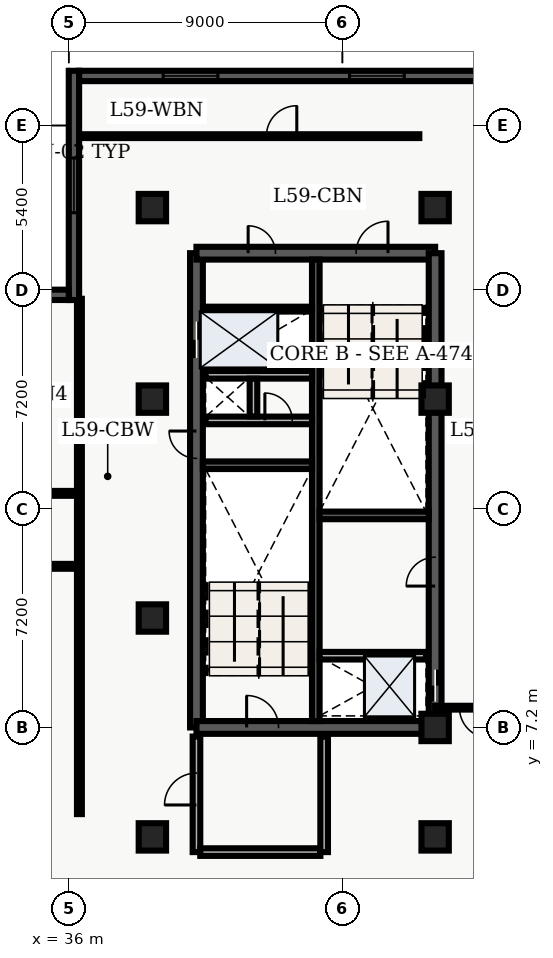
"""IFC4 building model, lengths in metres.
Left out: names, types, materials, properties, quantities, classifications, styles, units other than length and angle.
Written with IfcOpenShell. Run it as: python <this file> out.ifc"""

import sys

from ifc_helpers import new_model, entity, si_unit, converted_unit, direction, frame, origin_with_axes, origin_2d_with_axis, place, context, subcontext, project, spatial, polyline, rectangle, outline, extrude, element, fill, save


model = new_model("IFC4")
c1 = context("Model", 3, precision=1e-05, world=origin_with_axes(), true_north=direction((0.0, 1.0)))
c2 = subcontext(c1, "Body", "Model", "MODEL_VIEW")
j1 = project(units=[si_unit("LENGTHUNIT", "METRE"), converted_unit("PLANEANGLEUNIT", "DEGREE", entity("IfcPlaneAngleMeasure", 0.017), si_unit("PLANEANGLEUNIT", "RADIAN"), dimensions=[0, 0, 0, 0, 0, 0, 0])], contexts=[c1])
p1 = place(None, origin_with_axes())
s1 = spatial("IfcSite", under=j1, at=p1, CompositionType="ELEMENT")
p2 = place(p1, origin_with_axes())
s2 = spatial("IfcBuilding", under=s1, at=p2, CompositionType="ELEMENT")
p3 = place(p2, frame((0.0, 0.0, 240.3), z_axis=(0.0, 0.0, 1.0), x_axis=(1.0, 0.0, 0.0)))
s3 = spatial("IfcBuildingStorey", under=s2, at=p3, CompositionType="ELEMENT", Elevation=240.3)
p4 = place(p3, frame((40.2, 7.2, 0.0), z_axis=(0.0, 0.0, 1.0), x_axis=(0.0, 1.0, 0.0)))
e1 = element("IfcWall", 1, at=p4, inside=s3, PredefinedType="SHEAR", context=c2, shape_type="SweptSolid", body=[
    extrude(outline(polyline([(0.0, -0.21), (15.6, -0.21), (15.6, 0.21), (0.0, 0.21), (0.0, -0.21)])), origin_with_axes(), (0.0, 0.0, 1.0), 3.66),
])
p5 = place(p4, frame((12.75, 0.0, 0.0), z_axis=(0.0, 0.0, 1.0), x_axis=(1.0, 0.0, 0.0)))
e2 = element("IfcOpeningElement", 2, at=p5, cuts=e1, PredefinedType="OPENING", context=c2, shape_type="SweptSolid", body=[
    extrude(rectangle(XDim=1.2, YDim=0.44, at=origin_2d_with_axis()), origin_with_axes(), (0.0, 0.0, 1.0), 2.15),
])
p6 = place(p4, frame((9.3, 0.0, 0.0), z_axis=(0.0, 0.0, 1.0), x_axis=(1.0, 0.0, 0.0)))
e3 = element("IfcOpeningElement", 3, at=p6, cuts=e1, PredefinedType="OPENING", context=c2, shape_type="SweptSolid", body=[
    extrude(rectangle(XDim=0.9, YDim=0.44, at=origin_2d_with_axis()), origin_with_axes(), (0.0, 0.0, 1.0), 2.15),
])
p7 = place(p3, frame((40.2, 7.2, 0.0), z_axis=(0.0, 0.0, 1.0), x_axis=(1.0, 0.0, 0.0)))
e4 = element("IfcWall", 4, at=p7, inside=s3, PredefinedType="SHEAR", context=c2, shape_type="SweptSolid", body=[
    extrude(outline(polyline([(0.0, -0.21), (7.85, -0.21), (7.85, 0.21), (0.0, 0.21), (0.0, -0.21)])), origin_with_axes(), (0.0, 0.0, 1.0), 3.66),
])
p8 = place(p7, frame((2.175, 0.0, 0.0), z_axis=(0.0, 0.0, 1.0), x_axis=(1.0, 0.0, 0.0)))
e5 = element("IfcOpeningElement", 5, at=p8, cuts=e4, PredefinedType="OPENING", context=c2, shape_type="SweptSolid", body=[
    extrude(rectangle(XDim=1.05, YDim=0.44, at=origin_2d_with_axis()), origin_with_axes(), (0.0, 0.0, 1.0), 2.15),
])
p9 = place(p3, frame((40.2, 22.8, 0.0), z_axis=(0.0, 0.0, 1.0), x_axis=(1.0, 0.0, 0.0)))
e6 = element("IfcWall", 6, at=p9, inside=s3, PredefinedType="SHEAR", context=c2, shape_type="SweptSolid", body=[
    extrude(outline(polyline([(0.0, -0.21), (7.85, -0.21), (7.85, 0.21), (0.0, 0.21), (0.0, -0.21)])), origin_with_axes(), (0.0, 0.0, 1.0), 3.66),
])
p10 = place(p9, frame((5.775, 0.0, 0.0), z_axis=(0.0, 0.0, 1.0), x_axis=(1.0, 0.0, 0.0)))
e7 = element("IfcOpeningElement", 7, at=p10, cuts=e6, PredefinedType="OPENING", context=c2, shape_type="SweptSolid", body=[
    extrude(rectangle(XDim=1.05, YDim=0.44, at=origin_2d_with_axis()), origin_with_axes(), (0.0, 0.0, 1.0), 2.15),
])
p11 = place(p9, frame((2.15, 0.0, 0.0), z_axis=(0.0, 0.0, 1.0), x_axis=(1.0, 0.0, 0.0)))
e8 = element("IfcOpeningElement", 8, at=p11, cuts=e6, PredefinedType="OPENING", context=c2, shape_type="SweptSolid", body=[
    extrude(rectangle(XDim=0.9, YDim=0.44, at=origin_2d_with_axis()), origin_with_axes(), (0.0, 0.0, 1.0), 2.15),
])
p12 = place(p3, frame((48.05, 7.2, 0.0), z_axis=(0.0, 0.0, 1.0), x_axis=(0.0, 1.0, 0.0)))
e9 = element("IfcWall", 9, at=p12, inside=s3, PredefinedType="SHEAR", context=c2, shape_type="SweptSolid", body=[
    extrude(outline(polyline([(0.0, -0.21), (15.6, -0.21), (15.6, 0.21), (0.0, 0.21), (0.0, -0.21)])), origin_with_axes(), (0.0, 0.0, 1.0), 3.66),
])
p13 = place(p12, frame((1.375, 0.0, 0.0), z_axis=(0.0, 0.0, 1.0), x_axis=(1.0, 0.0, 0.0)))
e10 = element("IfcOpeningElement", 10, at=p13, cuts=e9, PredefinedType="OPENING", context=c2, shape_type="SweptSolid", body=[
    extrude(rectangle(XDim=1.05, YDim=0.44, at=origin_2d_with_axis()), origin_with_axes(), (0.0, 0.0, 1.0), 2.15),
])
p14 = place(p12, frame((5.125, 0.0, 0.0), z_axis=(0.0, 0.0, 1.0), x_axis=(1.0, 0.0, 0.0)))
e11 = element("IfcOpeningElement", 11, at=p14, cuts=e9, PredefinedType="OPENING", context=c2, shape_type="SweptSolid", body=[
    extrude(rectangle(XDim=0.95, YDim=0.44, at=origin_2d_with_axis()), origin_with_axes(), (0.0, 0.0, 1.0), 2.15),
])
p15 = place(p3, frame((44.125, 7.41, 0.0), z_axis=(0.0, 0.0, 1.0), x_axis=(0.0, 1.0, 0.0)))
e12 = element("IfcWall", 12, at=p15, inside=s3, PredefinedType="SHEAR", context=c2, shape_type="SweptSolid", body=[
    extrude(outline(polyline([(0.0, -0.125), (15.18, -0.125), (15.18, 0.125), (0.0, 0.125), (0.0, -0.125)])), origin_with_axes(), (0.0, 0.0, 1.0), 3.66),
])
for number, where, z_axis, x_axis in (
    (13, (40.41, 15.825, 0.0), (0.0, 0.0, 1.0), (1.0, 0.0, 0.0)),
    (14, (44.25, 14.175, 0.0), (0.0, 0.0, 1.0), (1.0, 0.0, 0.0)),
):
    element("IfcWall", number, at=place(p3, frame(where, z_axis=z_axis, x_axis=x_axis)), inside=s3, PredefinedType="SHEAR", context=c2, shape_type="SweptSolid", body=[
        extrude(outline(polyline([(0.0, -0.125), (3.59, -0.125), (3.59, 0.125), (0.0, 0.125), (0.0, -0.125)])), origin_with_axes(), (0.0, 0.0, 1.0), 3.66),
    ])
p16 = place(p3, frame((40.5, 17.3, 0.0), z_axis=(0.0, 0.0, 1.0), x_axis=(1.0, 0.0, 0.0)))
e15 = element("IfcWall", 15, at=p16, inside=s3, PredefinedType="SOLIDWALL", context=c2, shape_type="SweptSolid", body=[
    extrude(outline(polyline([(0.0, -0.125), (3.5, -0.125), (3.5, 0.125), (0.0, 0.125), (0.0, -0.125)])), origin_with_axes(), (0.0, 0.0, 1.0), 2.7),
])
p17 = place(p16, frame((2.4, 0.0, 0.0), z_axis=(0.0, 0.0, 1.0), x_axis=(1.0, 0.0, 0.0)))
e16 = element("IfcOpeningElement", 16, at=p17, cuts=e15, PredefinedType="OPENING", context=c2, shape_type="SweptSolid", body=[
    extrude(rectangle(XDim=0.9, YDim=0.27, at=origin_2d_with_axis()), origin_with_axes(), (0.0, 0.0, 1.0), 2.15),
])
p18 = place(p3, frame((40.5, 18.8, 0.0), z_axis=(0.0, 0.0, 1.0), x_axis=(1.0, 0.0, 0.0)))
e17 = element("IfcWall", 17, at=p18, inside=s3, PredefinedType="SOLIDWALL", context=c2, shape_type="SweptSolid", body=[
    extrude(outline(polyline([(0.0, -0.125), (3.5, -0.125), (3.5, 0.125), (0.0, 0.125), (0.0, -0.125)])), origin_with_axes(), (0.0, 0.0, 1.0), 2.7),
])
p19 = place(p3, frame((42.075, 17.43, 0.0), z_axis=(0.0, 0.0, 1.0), x_axis=(0.0, 1.0, 0.0)))
e18 = element("IfcWall", 18, at=p19, inside=s3, PredefinedType="SOLIDWALL", context=c2, shape_type="SweptSolid", body=[
    extrude(outline(polyline([(0.0, -0.125), (1.24, -0.125), (1.24, 0.125), (0.0, 0.125), (0.0, -0.125)])), origin_with_axes(), (0.0, 0.0, 1.0), 2.7),
])
p20 = place(p3, frame((40.2, 3.1, 0.0), z_axis=(0.0, 0.0, 1.0), x_axis=(0.0, 1.0, 0.0)))
e19 = element("IfcWall", 19, at=p20, inside=s3, PredefinedType="SOLIDWALL", context=c2, shape_type="SweptSolid", body=[
    extrude(outline(polyline([(0.0, -0.125), (3.8, -0.125), (3.8, 0.125), (0.0, 0.125), (0.0, -0.125)])), origin_with_axes(), (0.0, 0.0, 1.0), 2.7),
])
p21 = place(p20, frame((2.075, 0.0, 0.0), z_axis=(0.0, 0.0, 1.0), x_axis=(1.0, 0.0, 0.0)))
e20 = element("IfcOpeningElement", 20, at=p21, cuts=e19, PredefinedType="OPENING", context=c2, shape_type="SweptSolid", body=[
    extrude(rectangle(XDim=1.05, YDim=0.27, at=origin_2d_with_axis()), origin_with_axes(), (0.0, 0.0, 1.0), 2.15),
])
p22 = place(p3, frame((40.325, 3.1, 0.0), z_axis=(0.0, 0.0, 1.0), x_axis=(1.0, 0.0, 0.0)))
e21 = element("IfcWall", 21, at=p22, inside=s3, PredefinedType="SOLIDWALL", context=c2, shape_type="SweptSolid", body=[
    extrude(outline(polyline([(0.0, -0.125), (3.95, -0.125), (3.95, 0.125), (0.0, 0.125), (0.0, -0.125)])), origin_with_axes(), (0.0, 0.0, 1.0), 2.7),
])
p23 = place(p3, frame((44.4, 3.1, 0.0), z_axis=(0.0, 0.0, 1.0), x_axis=(0.0, 1.0, 0.0)))
e22 = element("IfcWall", 22, at=p23, inside=s3, PredefinedType="SOLIDWALL", context=c2, shape_type="SweptSolid", body=[
    extrude(outline(polyline([(0.0, -0.125), (3.8, -0.125), (3.8, 0.125), (0.0, 0.125), (0.0, -0.125)])), origin_with_axes(), (0.0, 0.0, 1.0), 2.7),
])
for number, where, z_axis, x_axis in (
    (23, (38.75, 3.6, 0.0), (0.0, 0.0, 1.0), (1.0, 0.0, 0.0)),
    (24, (38.75, 10.8, 0.0), (0.0, 0.0, 1.0), (1.0, 0.0, 0.0)),
    (25, (38.75, 18.0, 0.0), (0.0, 0.0, 1.0), (1.0, 0.0, 0.0)),
    (26, (38.75, 24.3, 0.0), (0.0, 0.0, 1.0), (1.0, 0.0, 0.0)),
    (27, (48.05, 3.6, 0.0), (0.0, 0.0, 1.0), (1.0, 0.0, 0.0)),
    (28, (48.05, 7.2, 0.0), (0.0, 0.0, 1.0), (1.0, 0.0, 0.0)),
    (29, (48.05, 18.0, 0.0), (0.0, 0.0, 1.0), (1.0, 0.0, 0.0)),
    (30, (48.05, 24.3, 0.0), (0.0, 0.0, 1.0), (1.0, 0.0, 0.0)),
):
    element("IfcColumn", number, at=place(p3, frame(where, z_axis=z_axis, x_axis=x_axis)), inside=s3, PredefinedType="COLUMN", context=c2, shape_type="SweptSolid", body=[
        extrude(rectangle(XDim=0.9, YDim=0.9, at=origin_2d_with_axis()), origin_with_axes(), (0.0, 0.0, 1.0), 3.9),
    ])
p24 = place(p3, frame((40.5, 20.96, 0.0), z_axis=(0.0, 0.0, 1.0), x_axis=(1.0, 0.0, 0.0)))
e31 = element("IfcWall", 31, at=p24, inside=s3, PredefinedType="PARTITIONING", context=c2, shape_type="SweptSolid", body=[
    extrude(outline(polyline([(0.0, -0.08), (3.5, -0.08), (3.5, 0.08), (0.0, 0.08), (0.0, -0.08)])), origin_with_axes(), (0.0, 0.0, 1.0), 2.7),
])
p25 = place(p3, frame((44.25, 9.56, 0.0), z_axis=(0.0, 0.0, 1.0), x_axis=(1.0, 0.0, 0.0)))
e32 = element("IfcWall", 32, at=p25, inside=s3, PredefinedType="SOLIDWALL", context=c2, shape_type="SweptSolid", body=[
    extrude(outline(polyline([(0.0, -0.125), (3.5, -0.125), (3.5, 0.125), (0.0, 0.125), (0.0, -0.125)])), origin_with_axes(), (0.0, 0.0, 1.0), 2.7),
])
p26 = place(p3, frame((20.3, 12.5, 0.0), z_axis=(0.0, 0.0, 1.0), x_axis=(1.0, 0.0, 0.0)))
e33 = element("IfcWall", 33, at=p26, inside=s3, PredefinedType="PARTITIONING", context=c2, shape_type="SweptSolid", body=[
    extrude(outline(polyline([(0.0, -0.08), (16.05, -0.08), (16.05, 0.08), (0.0, 0.08), (0.0, -0.08)])), origin_with_axes(), (0.0, 0.0, 1.0), 2.7),
])
p27 = place(p26, frame((8.075, 0.0, 0.0), z_axis=(0.0, 0.0, 1.0), x_axis=(1.0, 0.0, 0.0)))
e34 = element("IfcOpeningElement", 34, at=p27, cuts=e33, PredefinedType="OPENING", context=c2, shape_type="SweptSolid", body=[
    extrude(rectangle(XDim=1.0, YDim=0.18, at=origin_2d_with_axis()), origin_with_axes(), (0.0, 0.0, 1.0), 2.15),
])
p28 = place(p3, frame((20.3, 14.9, 0.0), z_axis=(0.0, 0.0, 1.0), x_axis=(1.0, 0.0, 0.0)))
e35 = element("IfcWall", 35, at=p28, inside=s3, PredefinedType="PARTITIONING", context=c2, shape_type="SweptSolid", body=[
    extrude(outline(polyline([(0.0, -0.08), (16.05, -0.08), (16.05, 0.08), (0.0, 0.08), (0.0, -0.08)])), origin_with_axes(), (0.0, 0.0, 1.0), 2.7),
])
p29 = place(p28, frame((2.358, 0.0, 0.0), z_axis=(0.0, 0.0, 1.0), x_axis=(1.0, 0.0, 0.0)))
e36 = element("IfcOpeningElement", 36, at=p29, cuts=e35, PredefinedType="OPENING", context=c2, shape_type="SweptSolid", body=[
    extrude(rectangle(XDim=1.0, YDim=0.18, at=origin_2d_with_axis()), origin_with_axes(), (0.0, 0.0, 1.0), 2.15),
])
p30 = place(p28, frame((5.918, 0.0, 0.0), z_axis=(0.0, 0.0, 1.0), x_axis=(1.0, 0.0, 0.0)))
e37 = element("IfcOpeningElement", 37, at=p30, cuts=e35, PredefinedType="OPENING", context=c2, shape_type="SweptSolid", body=[
    extrude(rectangle(XDim=1.0, YDim=0.18, at=origin_2d_with_axis()), origin_with_axes(), (0.0, 0.0, 1.0), 2.15),
])
p31 = place(p28, frame((9.89, 0.0, 0.0), z_axis=(0.0, 0.0, 1.0), x_axis=(1.0, 0.0, 0.0)))
e38 = element("IfcOpeningElement", 38, at=p31, cuts=e35, PredefinedType="OPENING", context=c2, shape_type="SweptSolid", body=[
    extrude(rectangle(XDim=1.2, YDim=0.18, at=origin_2d_with_axis()), origin_with_axes(), (0.0, 0.0, 1.0), 2.2),
])
p32 = place(p28, frame((14.225, 0.0, 0.0), z_axis=(0.0, 0.0, 1.0), x_axis=(1.0, 0.0, 0.0)))
e39 = element("IfcOpeningElement", 39, at=p32, cuts=e35, PredefinedType="OPENING", context=c2, shape_type="SweptSolid", body=[
    extrude(rectangle(XDim=1.0, YDim=0.18, at=origin_2d_with_axis()), origin_with_axes(), (0.0, 0.0, 1.0), 2.15),
])
p33 = place(p3, frame((36.35, 4.35, 0.0), z_axis=(0.0, 0.0, 1.0), x_axis=(0.0, 1.0, 0.0)))
e40 = element("IfcWall", 40, at=p33, inside=s3, PredefinedType="PARTITIONING", context=c2, shape_type="SweptSolid", body=[
    extrude(outline(polyline([(0.0, -0.08), (16.95, -0.08), (16.95, 0.08), (0.0, 0.08), (0.0, -0.08)])), origin_with_axes(), (0.0, 0.0, 1.0), 2.7),
])
p34 = place(p3, frame((51.865, 7.85, 0.0), z_axis=(0.0, 0.0, 1.0), x_axis=(-1.0, 0.0, 0.0)))
e41 = element("IfcWall", 41, at=p34, inside=s3, PredefinedType="PARTITIONING", context=c2, shape_type="SweptSolid", body=[
    extrude(outline(polyline([(0.0, -0.062), (3.815, -0.062), (3.815, 0.062), (0.0, 0.062), (0.0, -0.062)])), origin_with_axes(), (0.0, 0.0, 1.0), 2.7),
])
p35 = place(p34, frame((2.515, 0.0, 0.0), z_axis=(0.0, 0.0, 1.0), x_axis=(1.0, 0.0, 0.0)))
e42 = element("IfcOpeningElement", 42, at=p35, cuts=e41, PredefinedType="OPENING", context=c2, shape_type="SweptSolid", body=[
    extrude(rectangle(XDim=1.0, YDim=0.145, at=origin_2d_with_axis()), origin_with_axes(), (0.0, 0.0, 1.0), 2.15),
])
p36 = place(p3, frame((36.335, 26.65, 0.0), z_axis=(0.0, 0.0, 1.0), x_axis=(1.0, 0.0, 0.0)))
e43 = element("IfcWall", 43, at=p36, inside=s3, PredefinedType="PARTITIONING", context=c2, shape_type="SweptSolid", body=[
    extrude(outline(polyline([(0.0, -0.062), (11.195, -0.062), (11.195, 0.062), (0.0, 0.062), (0.0, -0.062)])), origin_with_axes(), (0.0, 0.0, 1.0), 2.7),
])
p37 = place(p36, frame((6.665, 0.0, 0.0), z_axis=(0.0, 0.0, 1.0), x_axis=(1.0, 0.0, 0.0)))
e44 = element("IfcOpeningElement", 44, at=p37, cuts=e43, PredefinedType="OPENING", context=c2, shape_type="SweptSolid", body=[
    extrude(rectangle(XDim=1.0, YDim=0.145, at=origin_2d_with_axis()), origin_with_axes(), (0.0, 0.0, 1.0), 2.15),
])
p38 = place(p3, frame((36.17, 21.26, 0.0), z_axis=(0.0, 0.0, 1.0), x_axis=(0.0, 1.0, 0.0)))
e45 = element("IfcWall", 45, at=p38, inside=s3, PredefinedType="SOLIDWALL", context=c2, shape_type="SweptSolid", body=[
    extrude(outline(polyline([(0.0, -0.17), (7.54, -0.17), (7.54, 0.17), (0.0, 0.17), (0.0, -0.17)])), origin_with_axes(), (0.0, 0.0, 1.0), 3.66),
])
p39 = place(p38, frame((3.77, 0.0, 0.45), z_axis=(0.0, 0.0, 1.0), x_axis=(1.0, 0.0, 0.0)))
e46 = element("IfcOpeningElement", 46, at=p39, cuts=e45, PredefinedType="OPENING", context=c2, shape_type="SweptSolid", body=[
    extrude(rectangle(XDim=1.8, YDim=0.36, at=origin_2d_with_axis()), origin_with_axes(), (0.0, 0.0, 1.0), 2.1),
])
p40 = place(p3, frame((36.34, 28.63, 0.0), z_axis=(0.0, 0.0, 1.0), x_axis=(1.0, 0.0, 0.0)))
e47 = element("IfcWall", 47, at=p40, inside=s3, PredefinedType="SOLIDWALL", context=c2, shape_type="SweptSolid", body=[
    extrude(outline(polyline([(0.0, -0.17), (13.46, -0.17), (13.46, 0.17), (0.0, 0.17), (0.0, -0.17)])), origin_with_axes(), (0.0, 0.0, 1.0), 3.66),
])
p41 = place(p40, frame((3.665, 0.0, 0.45), z_axis=(0.0, 0.0, 1.0), x_axis=(1.0, 0.0, 0.0)))
e48 = element("IfcOpeningElement", 48, at=p41, cuts=e47, PredefinedType="OPENING", context=c2, shape_type="SweptSolid", body=[
    extrude(rectangle(XDim=1.8, YDim=0.36, at=origin_2d_with_axis()), origin_with_axes(), (0.0, 0.0, 1.0), 2.1),
])
p42 = place(p40, frame((9.795, 0.0, 0.45), z_axis=(0.0, 0.0, 1.0), x_axis=(1.0, 0.0, 0.0)))
e49 = element("IfcOpeningElement", 49, at=p42, cuts=e47, PredefinedType="OPENING", context=c2, shape_type="SweptSolid", body=[
    extrude(rectangle(XDim=1.8, YDim=0.36, at=origin_2d_with_axis()), origin_with_axes(), (0.0, 0.0, 1.0), 2.1),
])
p43 = place(p3, frame((32.06, 21.43, 0.0), z_axis=(0.0, 0.0, 1.0), x_axis=(1.0, 0.0, 0.0)))
e50 = element("IfcWall", 50, at=p43, inside=s3, PredefinedType="SOLIDWALL", context=c2, shape_type="SweptSolid", body=[
    extrude(outline(polyline([(0.0, -0.17), (3.94, -0.17), (3.94, 0.17), (0.0, 0.17), (0.0, -0.17)])), origin_with_axes(), (0.0, 0.0, 1.0), 3.66),
])
p44 = place(p12, frame((1.375, 0.0, 0.0), z_axis=(0.0, 0.0, 1.0), x_axis=(1.0, 0.0, 0.0)))
e51 = element("IfcDoor", 51, at=p44, inside=s3, OperationType="SLIDING_TO_LEFT", PredefinedType="DOOR", context=c2, shape_type="SweptSolid", body=[
    extrude(rectangle(XDim=1.05, YDim=0.09, at=origin_2d_with_axis()), origin_with_axes(), (0.0, 0.0, 1.0), 2.15),
])
fill(e10, e51)
p45 = place(p4, frame((12.75, 0.0, 0.0), z_axis=(0.0, 0.0, 1.0), x_axis=(1.0, 0.0, 0.0)))
e52 = element("IfcDoor", 52, at=p45, inside=s3, OperationType="DOUBLE_DOOR_SLIDING", PredefinedType="DOOR", context=c2, shape_type="SweptSolid", body=[
    extrude(rectangle(XDim=1.2, YDim=0.09, at=origin_2d_with_axis()), origin_with_axes(), (0.0, 0.0, 1.0), 2.15),
])
fill(e2, e52)
p46 = place(p4, frame((9.3, 0.0, 0.0), z_axis=(0.0, 0.0, 1.0), x_axis=(1.0, 0.0, 0.0)))
e53 = element("IfcDoor", 53, at=p46, inside=s3, OperationType="SINGLE_SWING_RIGHT", PredefinedType="DOOR", context=c2, shape_type="SweptSolid", body=[
    extrude(rectangle(XDim=0.9, YDim=0.09, at=origin_2d_with_axis()), origin_with_axes(), (0.0, 0.0, 1.0), 2.15),
])
fill(e3, e53)
p47 = place(p16, frame((2.4, 0.0, 0.0), z_axis=(0.0, 0.0, 1.0), x_axis=(1.0, 0.0, 0.0)))
e54 = element("IfcDoor", 54, at=p47, inside=s3, OperationType="SINGLE_SWING_LEFT", PredefinedType="DOOR", context=c2, shape_type="SweptSolid", body=[
    extrude(rectangle(XDim=0.9, YDim=0.09, at=origin_2d_with_axis()), origin_with_axes(), (0.0, 0.0, 1.0), 2.15),
])
fill(e16, e54)
p48 = place(p7, frame((2.175, 0.0, 0.0), z_axis=(0.0, 0.0, 1.0), x_axis=(1.0, 0.0, 0.0)))
e55 = element("IfcDoor", 55, at=p48, inside=s3, OperationType="SINGLE_SWING_LEFT", PredefinedType="DOOR", context=c2, shape_type="SweptSolid", body=[
    extrude(rectangle(XDim=1.05, YDim=0.09, at=origin_2d_with_axis()), origin_with_axes(), (0.0, 0.0, 1.0), 2.15),
])
fill(e5, e55)
p49 = place(p9, frame((5.775, 0.0, 0.0), z_axis=(0.0, 0.0, 1.0), x_axis=(1.0, 0.0, 0.0)))
e56 = element("IfcDoor", 56, at=p49, inside=s3, OperationType="SINGLE_SWING_RIGHT", PredefinedType="DOOR", context=c2, shape_type="SweptSolid", body=[
    extrude(rectangle(XDim=1.05, YDim=0.09, at=origin_2d_with_axis()), origin_with_axes(), (0.0, 0.0, 1.0), 2.15),
])
fill(e7, e56)
p50 = place(p20, frame((2.075, 0.0, 0.0), z_axis=(0.0, 0.0, 1.0), x_axis=(1.0, 0.0, 0.0)))
e57 = element("IfcDoor", 57, at=p50, inside=s3, OperationType="SINGLE_SWING_LEFT", PredefinedType="DOOR", context=c2, shape_type="SweptSolid", body=[
    extrude(rectangle(XDim=1.05, YDim=0.09, at=origin_2d_with_axis()), origin_with_axes(), (0.0, 0.0, 1.0), 2.15),
])
fill(e20, e57)
p51 = place(p9, frame((2.15, 0.0, 0.0), z_axis=(0.0, 0.0, 1.0), x_axis=(1.0, 0.0, 0.0)))
e58 = element("IfcDoor", 58, at=p51, inside=s3, OperationType="SINGLE_SWING_LEFT", PredefinedType="DOOR", context=c2, shape_type="SweptSolid", body=[
    extrude(rectangle(XDim=0.9, YDim=0.09, at=origin_2d_with_axis()), origin_with_axes(), (0.0, 0.0, 1.0), 2.15),
])
fill(e8, e58)
p52 = place(p12, frame((5.125, 0.0, 0.0), z_axis=(0.0, 0.0, 1.0), x_axis=(1.0, 0.0, 0.0)))
e59 = element("IfcDoor", 59, at=p52, inside=s3, OperationType="SINGLE_SWING_LEFT", PredefinedType="DOOR", context=c2, shape_type="SweptSolid", body=[
    extrude(rectangle(XDim=0.95, YDim=0.09, at=origin_2d_with_axis()), origin_with_axes(), (0.0, 0.0, 1.0), 2.15),
])
fill(e11, e59)
p53 = place(p34, frame((2.515, 0.0, 0.0), z_axis=(0.0, 0.0, 1.0), x_axis=(1.0, 0.0, 0.0)))
e60 = element("IfcDoor", 60, at=p53, inside=s3, OperationType="SINGLE_SWING_LEFT", PredefinedType="DOOR", context=c2, shape_type="SweptSolid", body=[
    extrude(rectangle(XDim=1.0, YDim=0.075, at=origin_2d_with_axis()), origin_with_axes(), (0.0, 0.0, 1.0), 2.15),
])
fill(e42, e60)
p54 = place(p36, frame((6.665, 0.0, 0.0), z_axis=(0.0, 0.0, 1.0), x_axis=(1.0, 0.0, 0.0)))
e61 = element("IfcDoor", 61, at=p54, inside=s3, OperationType="SINGLE_SWING_RIGHT", PredefinedType="DOOR", context=c2, shape_type="SweptSolid", body=[
    extrude(rectangle(XDim=1.0, YDim=0.075, at=origin_2d_with_axis()), origin_with_axes(), (0.0, 0.0, 1.0), 2.15),
])
fill(e44, e61)
p55 = place(p38, frame((3.77, 0.0, 0.45), z_axis=(0.0, 0.0, 1.0), x_axis=(1.0, 0.0, 0.0)))
e62 = element("IfcWindow", 62, at=p55, inside=s3, PredefinedType="WINDOW", context=c2, shape_type="SweptSolid", body=[
    extrude(rectangle(XDim=1.8, YDim=0.09, at=origin_2d_with_axis()), origin_with_axes(), (0.0, 0.0, 1.0), 2.1),
])
fill(e46, e62)
p56 = place(p40, frame((3.665, 0.0, 0.45), z_axis=(0.0, 0.0, 1.0), x_axis=(1.0, 0.0, 0.0)))
e63 = element("IfcWindow", 63, at=p56, inside=s3, PredefinedType="WINDOW", context=c2, shape_type="SweptSolid", body=[
    extrude(rectangle(XDim=1.8, YDim=0.09, at=origin_2d_with_axis()), origin_with_axes(), (0.0, 0.0, 1.0), 2.1),
])
fill(e48, e63)
p57 = place(p40, frame((9.795, 0.0, 0.45), z_axis=(0.0, 0.0, 1.0), x_axis=(1.0, 0.0, 0.0)))
e64 = element("IfcWindow", 64, at=p57, inside=s3, PredefinedType="WINDOW", context=c2, shape_type="SweptSolid", body=[
    extrude(rectangle(XDim=1.8, YDim=0.09, at=origin_2d_with_axis()), origin_with_axes(), (0.0, 0.0, 1.0), 2.1),
])
fill(e49, e64)
save(model, sys.argv[1])
